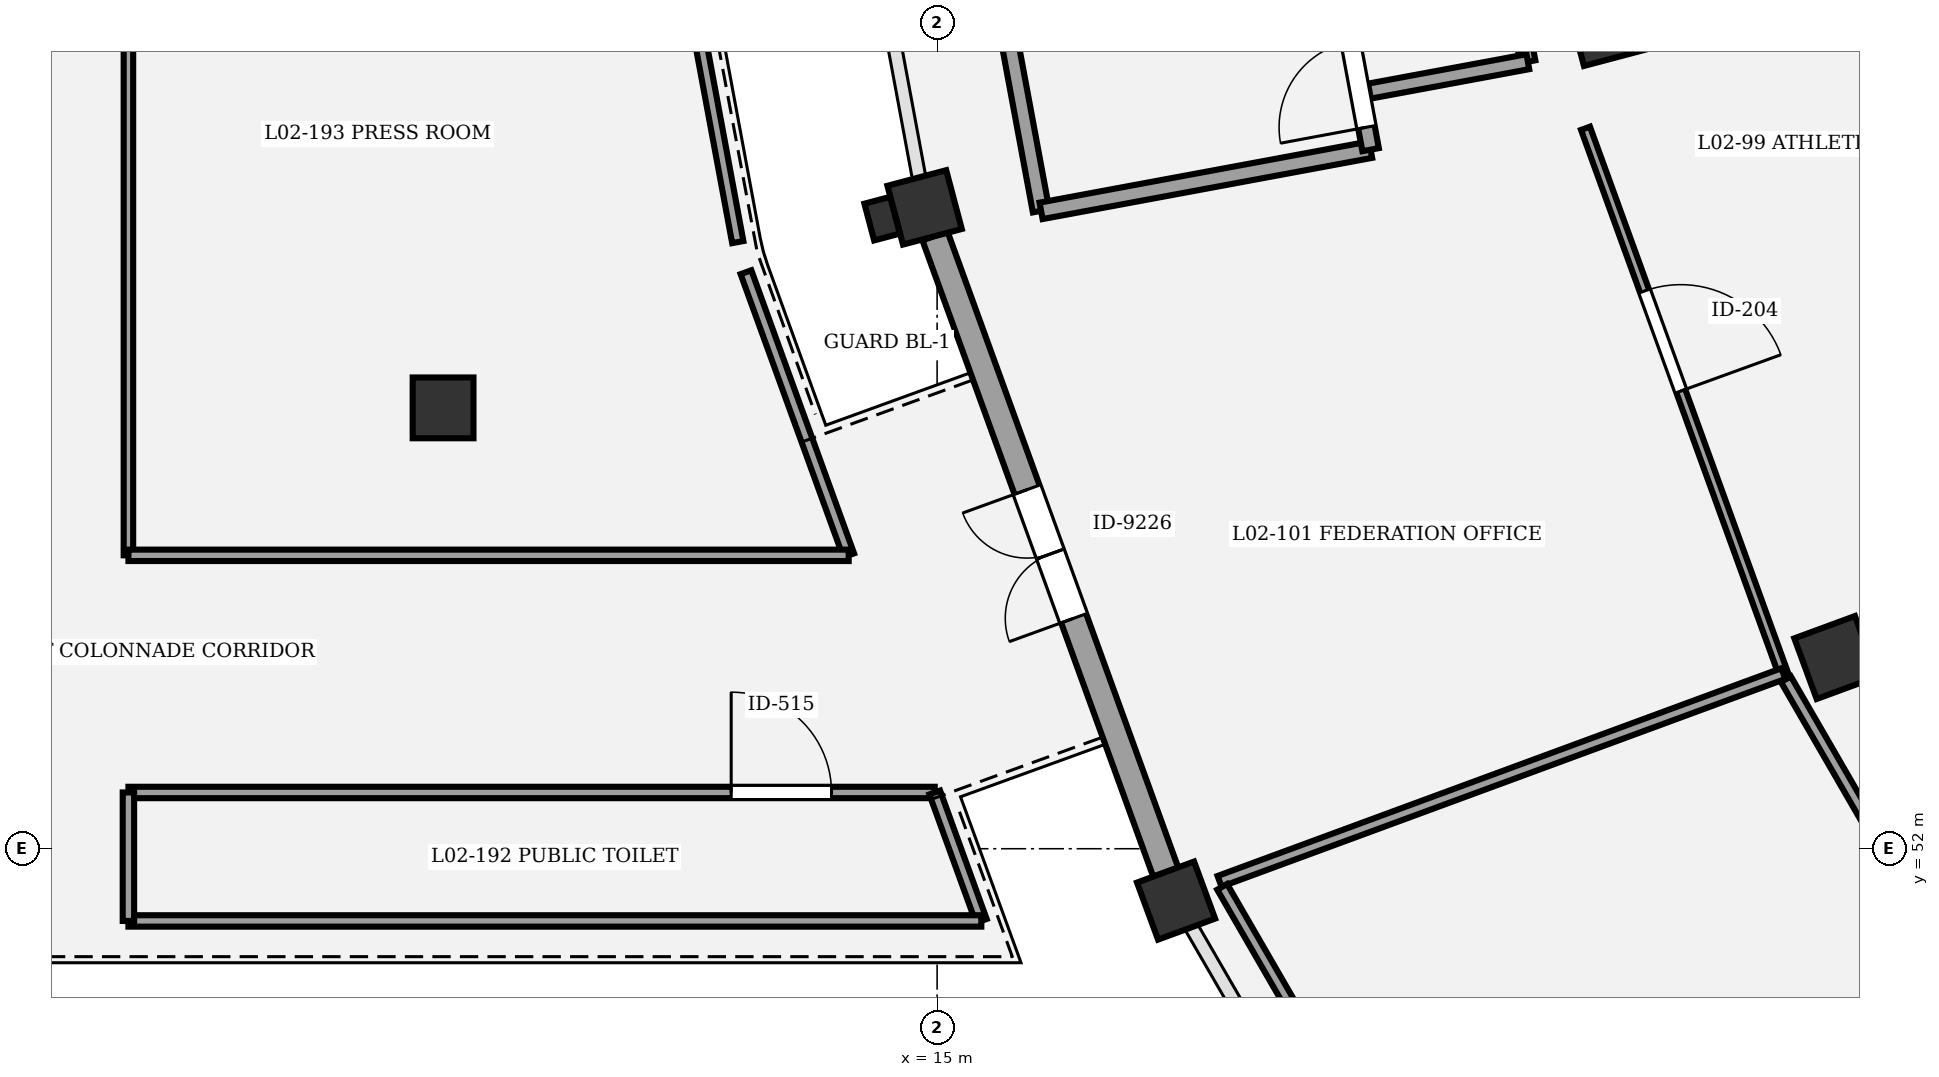
"""IFC4 building model, lengths in metres.
Left out: names, types, materials, properties, quantities, classifications, styles, units other than length and angle.
Written with IfcOpenShell. Run it as: python <this file> out.ifc"""

import sys

from ifc_helpers import new_model, si_unit, direction, frame, frame_2d, origin, origin_2d, place, context, subcontext, project, spatial, rectangle, circle, extrude, element, fill, save


model = new_model("IFC4")
c1 = context("Model", 3, precision=1e-05, world=origin(), true_north=direction((0.0, 1.0)))
c2 = subcontext(c1, "Body", "Model", "MODEL_VIEW")
j1 = project(units=[si_unit("LENGTHUNIT", "METRE"), si_unit("PLANEANGLEUNIT", "RADIAN")], contexts=[c1])
p1 = place(None, origin())
s1 = spatial("IfcSite", under=j1, at=p1, CompositionType="ELEMENT")
p2 = place(p1, origin())
s2 = spatial("IfcBuilding", under=s1, at=p2, CompositionType="ELEMENT")
p3 = place(p2, frame((0.0, 0.0, 10.2)))
s3 = spatial("IfcBuildingStorey", under=s2, at=p3, CompositionType="ELEMENT", Elevation=10.2)
p4 = place(p3, frame((23.812, 62.818, 0.0), z_axis=(0.0, 0.0, 1.0), x_axis=(-0.966600102017, -0.256289373133, 0.0)))
e1 = element("IfcColumn", 1, at=p4, inside=s3, PredefinedType="COLUMN", context=c2, shape_type="SweptSolid", body=[
    extrude(rectangle(XDim=0.85, YDim=0.85, at=origin_2d()), origin(), (0.0, 0.0, 1.0), 4.5),
])
p5 = place(p3, frame((14.835, 60.438, 0.0), z_axis=(0.0, 0.0, 1.0), x_axis=(-0.966600102017, -0.256289373133, 0.0)))
e2 = element("IfcColumn", 2, at=p5, inside=s3, PredefinedType="COLUMN", context=c2, shape_type="SweptSolid", body=[
    extrude(rectangle(XDim=0.8, YDim=0.8, at=origin_2d()), origin(), (0.0, 0.0, 1.0), 4.5),
])
p6 = place(p3, frame((14.277, 60.289, 0.0), z_axis=(0.0, 0.0, 1.0), x_axis=(0.256289373133, -0.966600102017, 0.0)))
e3 = element("IfcColumn", 3, at=p6, inside=s3, PredefinedType="PILASTER", context=c2, shape_type="SweptSolid", body=[
    extrude(rectangle(XDim=0.5, YDim=0.35, at=origin_2d()), origin(), (0.0, 0.0, 1.0), 4.5),
])
p7 = place(p3, frame((26.824, 54.516, 0.0), z_axis=(0.0, 0.0, 1.0), x_axis=(-0.938372433776, -0.34562577382, 0.0)))
e4 = element("IfcColumn", 4, at=p7, inside=s3, PredefinedType="COLUMN", context=c2, shape_type="SweptSolid", body=[
    extrude(rectangle(XDim=0.85, YDim=0.85, at=origin_2d()), origin(), (0.0, 0.0, 1.0), 4.5),
])
p8 = place(p3, frame((18.144, 51.318, 0.0), z_axis=(0.0, 0.0, 1.0), x_axis=(-0.938372433776, -0.34562577382, 0.0)))
e5 = element("IfcColumn", 5, at=p8, inside=s3, PredefinedType="COLUMN", context=c2, shape_type="SweptSolid", body=[
    extrude(rectangle(XDim=0.8, YDim=0.8, at=origin_2d()), origin(), (0.0, 0.0, 1.0), 4.5),
])
p9 = place(p3, frame((8.5, 57.8, 0.0), z_axis=(0.0, 0.0, 1.0), x_axis=(1.0, 0.0, 0.0)))
e6 = element("IfcColumn", 6, at=p9, inside=s3, PredefinedType="COLUMN", context=c2, shape_type="SweptSolid", body=[
    extrude(circle(Radius=0.4, at=origin_2d()), origin(), (0.0, 0.0, 1.0), 4.5),
])
p10 = place(p3, frame((18.008, 51.692, 0.0), z_axis=(0.0, 0.0, 1.0), x_axis=(-0.34103858998, 0.940049296657, 0.0)))
e7 = element("IfcWall", 7, at=p10, inside=s3, PredefinedType="STANDARD", context=c2, shape_type="SweptSolid", body=[
    extrude(rectangle(XDim=8.906, YDim=0.35, at=frame_2d((4.453, 0.0))), origin(), (0.0, 0.0, 1.0), 3.42),
])
p11 = place(p10, frame((3.553, 0.0, 0.0)))
e8 = element("IfcOpeningElement", 8, at=p11, cuts=e7, PredefinedType="OPENING", context=c2, shape_type="SweptSolid", body=[
    extrude(rectangle(XDim=1.8, YDim=2.4, at=frame_2d((0.9, 1.2))), frame((0.0, 0.185, 0.0), z_axis=(0.0, -1.0, 0.0), x_axis=(1.0, 0.0, 0.0)), (0.0, 0.0, 1.0), 0.37),
])
p12 = place(p3, frame((16.368, 60.392, 0.0), z_axis=(0.0, 0.0, 1.0), x_axis=(-0.182570778451, 0.983192712979, 0.0)))
e9 = element("IfcWall", 9, at=p12, inside=s3, PredefinedType="SHEAR", context=c2, shape_type="SweptSolid", body=[
    extrude(rectangle(XDim=11.02, YDim=0.22, at=frame_2d((5.51, 0.0))), origin(), (0.0, 0.0, 1.0), 4.25),
])
p13 = place(p3, frame((20.704, 61.197, 0.0), z_axis=(0.0, 0.0, 1.0), x_axis=(-0.983191575486, -0.182576904051, 0.0)))
e10 = element("IfcWall", 10, at=p13, inside=s3, PredefinedType="SHEAR", context=c2, shape_type="SweptSolid", body=[
    extrude(rectangle(XDim=4.41, YDim=0.22, at=frame_2d((2.205, 0.0))), origin(), (0.0, 0.0, 1.0), 4.25),
])
p14 = place(p3, frame((20.704, 61.197, 0.0), z_axis=(0.0, 0.0, 1.0), x_axis=(-0.182570778451, 0.983192712979, 0.0)))
e11 = element("IfcWall", 11, at=p14, inside=s3, PredefinedType="SHEAR", context=c2, shape_type="SweptSolid", body=[
    extrude(rectangle(XDim=11.02, YDim=0.22, at=frame_2d((5.51, 0.0))), origin(), (0.0, 0.0, 1.0), 4.25),
])
p15 = place(p14, frame((0.3, 0.0, 0.0)))
e12 = element("IfcOpeningElement", 12, at=p15, cuts=e11, PredefinedType="OPENING", context=c2, shape_type="SweptSolid", body=[
    extrude(rectangle(XDim=1.15, YDim=2.15, at=frame_2d((0.575, 1.075))), frame((0.0, 0.12, 0.0), z_axis=(0.0, -1.0, 0.0), x_axis=(1.0, 0.0, 0.0)), (0.0, 0.0, 1.0), 0.24),
])
p16 = place(p14, frame((9.23, 0.0, 0.0)))
e13 = element("IfcOpeningElement", 13, at=p16, cuts=e11, PredefinedType="OPENING", context=c2, shape_type="SweptSolid", body=[
    extrude(rectangle(XDim=1.1, YDim=2.15, at=frame_2d((0.55, 1.075))), frame((0.0, 0.12, 0.0), z_axis=(0.0, -1.0, 0.0), x_axis=(1.0, 0.0, 0.0)), (0.0, 0.0, 1.0), 0.24),
])
p17 = place(p3, frame((22.772, 62.354, 0.0), z_axis=(0.0, 0.0, 1.0), x_axis=(-0.182593081072, 0.983188571305, 0.0)))
e14 = element("IfcWall", 14, at=p17, inside=s3, PredefinedType="PARTITIONING", context=c2, shape_type="SweptSolid", body=[
    extrude(rectangle(XDim=3.8, YDim=0.2, at=frame_2d((1.9, 0.0))), origin(), (0.0, 0.0, 1.0), 3.35),
])
p18 = place(p17, frame((1.3, 0.0, 0.0)))
e15 = element("IfcOpeningElement", 15, at=p18, cuts=e14, PredefinedType="OPENING", context=c2, shape_type="SweptSolid", body=[
    extrude(rectangle(XDim=1.2, YDim=2.18, at=frame_2d((0.6, 1.09))), frame((0.0, 0.11, 0.0), z_axis=(0.0, -1.0, 0.0), x_axis=(1.0, 0.0, 0.0)), (0.0, 0.0, 1.0), 0.22),
])
p19 = place(p3, frame((22.772, 62.354, 0.0), z_axis=(0.0, 0.0, 1.0), x_axis=(-0.983181056789, -0.18263353901, 0.0)))
e16 = element("IfcWall", 16, at=p19, inside=s3, PredefinedType="PARTITIONING", context=c2, shape_type="SweptSolid", body=[
    extrude(rectangle(XDim=2.12, YDim=0.2, at=frame_2d((1.06, 0.0))), origin(), (0.0, 0.0, 1.0), 3.35),
])
p20 = place(p3, frame((23.531, 61.478, 0.0), z_axis=(0.0, 0.0, 1.0), x_axis=(0.341013494536, -0.940058400603, 0.0)))
e17 = element("IfcWall", 17, at=p20, inside=s3, PredefinedType="PARTITIONING", context=c2, shape_type="SweptSolid", body=[
    extrude(rectangle(XDim=7.632, YDim=0.125, at=frame_2d((3.816, 0.0))), origin(), (0.0, 0.0, 1.0), 3.25),
])
p21 = place(p20, frame((2.277, 0.0, 0.0)))
e18 = element("IfcOpeningElement", 18, at=p21, cuts=e17, PredefinedType="OPENING", context=c2, shape_type="SweptSolid", body=[
    extrude(rectangle(XDim=1.4, YDim=2.2, at=frame_2d((0.7, 1.1))), frame((0.0, 0.073, 0.0), z_axis=(0.0, -1.0, 0.0), x_axis=(1.0, 0.0, 0.0)), (0.0, 0.0, 1.0), 0.145),
])
p22 = place(p3, frame((26.167, 54.231, 0.0), z_axis=(0.0, 0.0, 1.0), x_axis=(0.500559280672, -0.865702262059, 0.0)))
e19 = element("IfcWall", 19, at=p22, inside=s3, PredefinedType="PARTITIONING", context=c2, shape_type="SweptSolid", body=[
    extrude(rectangle(XDim=8.375, YDim=0.15, at=frame_2d((4.187, 0.0))), origin(), (0.0, 0.0, 1.0), 3.25),
])
p23 = place(p22, frame((3.717, 0.0, 0.0)))
e20 = element("IfcOpeningElement", 20, at=p23, cuts=e19, PredefinedType="OPENING", context=c2, shape_type="SweptSolid", body=[
    extrude(rectangle(XDim=0.94, YDim=2.3, at=frame_2d((0.47, 1.15))), frame((0.0, 0.085, 0.0), z_axis=(0.0, -1.0, 0.0), x_axis=(1.0, 0.0, 0.0)), (0.0, 0.0, 1.0), 0.17),
])
p24 = place(p3, frame((4.36, 52.74, 0.0), z_axis=(0.0, 0.0, 1.0), x_axis=(1.0, 0.0, 0.0)))
e21 = element("IfcWall", 21, at=p24, inside=s3, PredefinedType="PARTITIONING", context=c2, shape_type="SweptSolid", body=[
    extrude(rectangle(XDim=10.608, YDim=0.15, at=frame_2d((5.304, 0.0))), origin(), (0.0, 0.0, 1.0), 3.25),
])
p25 = place(p24, frame((7.931, 0.0, 0.0)))
e22 = element("IfcOpeningElement", 22, at=p25, cuts=e21, PredefinedType="OPENING", context=c2, shape_type="SweptSolid", body=[
    extrude(rectangle(XDim=1.32, YDim=2.1, at=frame_2d((0.66, 1.05))), frame((0.0, 0.085, 0.0), z_axis=(0.0, -1.0, 0.0), x_axis=(1.0, 0.0, 0.0)), (0.0, 0.0, 1.0), 0.17),
])
p26 = place(p3, frame((4.36, 55.86, 0.0), z_axis=(0.0, 0.0, 1.0), x_axis=(0.0, 1.0, 0.0)))
e23 = element("IfcWall", 23, at=p26, inside=s3, PredefinedType="PARTITIONING", context=c2, shape_type="SweptSolid", body=[
    extrude(rectangle(XDim=18.69, YDim=0.125, at=frame_2d((9.345, 0.0))), origin(), (0.0, 0.0, 1.0), 3.25),
])
p27 = place(p26, frame((11.143, 0.0, 0.0)))
e24 = element("IfcOpeningElement", 24, at=p27, cuts=e23, PredefinedType="OPENING", context=c2, shape_type="SweptSolid", body=[
    extrude(rectangle(XDim=1.4, YDim=2.1, at=frame_2d((0.7, 1.05))), frame((0.0, 0.073, 0.0), z_axis=(0.0, -1.0, 0.0), x_axis=(1.0, 0.0, 0.0)), (0.0, 0.0, 1.0), 0.145),
])
p28 = place(p3, frame((26.134, 54.304, 0.0), z_axis=(0.0, 0.0, 1.0), x_axis=(-0.938346807893, -0.345695340028, 0.0)))
e25 = element("IfcWall", 25, at=p28, inside=s3, PredefinedType="PARTITIONING", context=c2, shape_type="SweptSolid", body=[
    extrude(rectangle(XDim=7.905, YDim=0.15, at=frame_2d((3.952, 0.0))), origin(), (0.0, 0.0, 1.0), 3.25),
])
p29 = place(p3, frame((23.296, 43.638, 0.0), z_axis=(0.0, 0.0, 1.0), x_axis=(-0.500574107164, 0.865693689036, 0.0)))
e26 = element("IfcWall", 26, at=p29, inside=s3, PredefinedType="PARTITIONING", context=c2, shape_type="SweptSolid", body=[
    extrude(rectangle(XDim=9.08, YDim=0.15, at=frame_2d((4.54, 0.0))), origin(), (0.0, 0.0, 1.0), 3.25),
])
p30 = place(p3, frame((14.969, 52.74, 0.0), z_axis=(0.0, 0.0, 1.0), x_axis=(0.341012375502, -0.940058806541, 0.0)))
e27 = element("IfcWall", 27, at=p30, inside=s3, PredefinedType="PARTITIONING", context=c2, shape_type="SweptSolid", body=[
    extrude(rectangle(XDim=1.798, YDim=0.15, at=frame_2d((0.899, 0.0))), origin(), (0.0, 0.0, 1.0), 3.25),
])
p31 = place(p3, frame((15.582, 51.05, 0.0), z_axis=(0.0, 0.0, 1.0), x_axis=(-1.0, 0.0, 0.0)))
e28 = element("IfcWall", 28, at=p31, inside=s3, PredefinedType="PARTITIONING", context=c2, shape_type="SweptSolid", body=[
    extrude(rectangle(XDim=11.221, YDim=0.15, at=frame_2d((5.611, 0.0))), origin(), (0.0, 0.0, 1.0), 3.25),
])
p32 = place(p3, frame((4.36, 51.05, 0.0), z_axis=(0.0, 0.0, 1.0), x_axis=(0.0, 1.0, 0.0)))
e29 = element("IfcWall", 29, at=p32, inside=s3, PredefinedType="PARTITIONING", context=c2, shape_type="SweptSolid", body=[
    extrude(rectangle(XDim=1.69, YDim=0.15, at=frame_2d((0.845, 0.0))), origin(), (0.0, 0.0, 1.0), 3.25),
])
p33 = place(p3, frame((10.387, 70.698, 0.0), z_axis=(0.0, 0.0, 1.0), x_axis=(0.182620957058, -0.983183393901, 0.0)))
e30 = element("IfcWall", 30, at=p33, inside=s3, PredefinedType="PARTITIONING", context=c2, shape_type="SweptSolid", body=[
    extrude(rectangle(XDim=10.901, YDim=0.15, at=frame_2d((5.45, 0.0))), origin(), (0.0, 0.0, 1.0), 3.25),
])
p34 = place(p3, frame((12.485, 59.585, 0.0), z_axis=(0.0, 0.0, 1.0), x_axis=(0.341035525383, -0.94005040845, 0.0)))
e31 = element("IfcWall", 31, at=p34, inside=s3, PredefinedType="PARTITIONING", context=c2, shape_type="SweptSolid", body=[
    extrude(rectangle(XDim=3.962, YDim=0.15, at=frame_2d((1.981, 0.0))), origin(), (0.0, 0.0, 1.0), 3.25),
])
p35 = place(p3, frame((13.837, 55.86, 0.0), z_axis=(0.0, 0.0, 1.0), x_axis=(-1.0, 0.0, 0.0)))
e32 = element("IfcWall", 32, at=p35, inside=s3, PredefinedType="PARTITIONING", context=c2, shape_type="SweptSolid", body=[
    extrude(rectangle(XDim=9.477, YDim=0.15, at=frame_2d((4.738, 0.0))), origin(), (0.0, 0.0, 1.0), 3.25),
])
p36 = place(p11, origin())
e33 = element("IfcDoor", 33, at=p36, inside=s3, OperationType="DOUBLE_DOOR_SINGLE_SWING", PredefinedType="DOOR", context=c2, shape_type="SweptSolid", body=[
    extrude(rectangle(XDim=1.8, YDim=2.4, at=frame_2d((0.9, 1.2))), frame((0.0, 0.025, 0.0), z_axis=(0.0, -1.0, 0.0), x_axis=(1.0, 0.0, 0.0)), (0.0, 0.0, 1.0), 0.05),
])
fill(e8, e33)
p37 = place(p15, origin())
e34 = element("IfcDoor", 34, at=p37, inside=s3, OperationType="SINGLE_SWING_LEFT", PredefinedType="DOOR", context=c2, shape_type="SweptSolid", body=[
    extrude(rectangle(XDim=1.15, YDim=2.15, at=frame_2d((0.575, 1.075))), frame((0.0, 0.025, 0.0), z_axis=(0.0, -1.0, 0.0), x_axis=(1.0, 0.0, 0.0)), (0.0, 0.0, 1.0), 0.05),
])
fill(e12, e34)
p38 = place(p21, origin())
e35 = element("IfcDoor", 35, at=p38, inside=s3, OperationType="SINGLE_SWING_RIGHT", PredefinedType="DOOR", context=c2, shape_type="SweptSolid", body=[
    extrude(rectangle(XDim=1.4, YDim=2.2, at=frame_2d((0.7, 1.1))), frame((0.0, 0.025, 0.0), z_axis=(0.0, -1.0, 0.0), x_axis=(1.0, 0.0, 0.0)), (0.0, 0.0, 1.0), 0.05),
])
fill(e18, e35)
p39 = place(p25, origin())
e36 = element("IfcDoor", 36, at=p39, inside=s3, OperationType="SINGLE_SWING_LEFT", PredefinedType="DOOR", context=c2, shape_type="SweptSolid", body=[
    extrude(rectangle(XDim=1.32, YDim=2.1, at=frame_2d((0.66, 1.05))), frame((0.0, 0.025, 0.0), z_axis=(0.0, -1.0, 0.0), x_axis=(1.0, 0.0, 0.0)), (0.0, 0.0, 1.0), 0.05),
])
fill(e22, e36)
save(model, sys.argv[1])
